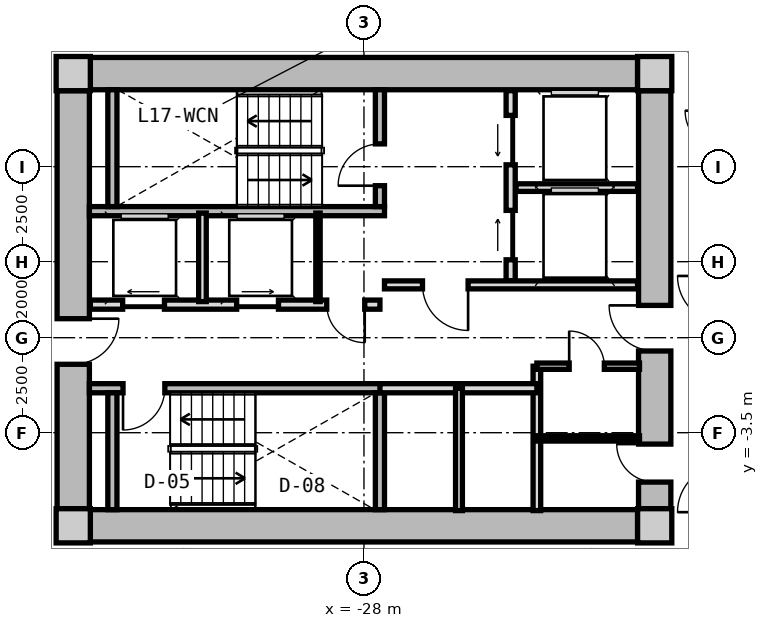
"""IFC4 building model, lengths in metres.
Left out: names, types, materials, properties, quantities, classifications, styles, units other than length and angle.
Written with IfcOpenShell. Run it as: python <this file> out.ifc"""

import sys

from ifc_helpers import new_model, si_unit, direction, frame, frame_2d, origin, origin_2d, place, context, subcontext, project, spatial, rectangle, extrude, source, transform, mapped, element, fill, save


model = new_model("IFC4")
c1 = context("Model", 3, precision=1e-05, world=origin(), true_north=direction((0.0, 1.0)))
c2 = subcontext(c1, "Body", "Model", "MODEL_VIEW")
j1 = project(units=[si_unit("LENGTHUNIT", "METRE"), si_unit("PLANEANGLEUNIT", "RADIAN")], contexts=[c1])
p1 = place(None, origin())
s1 = spatial("IfcSite", under=j1, at=p1, CompositionType="ELEMENT")
p2 = place(p1, origin())
s2 = spatial("IfcBuilding", under=s1, at=p2, CompositionType="ELEMENT")
p3 = place(p2, frame((0.0, 0.0, 58.2)))
s3 = spatial("IfcBuildingStorey", under=s2, at=p3, CompositionType="ELEMENT", Elevation=58.2)
m1 = source(origin(), c2, "Body", "SweptSolid", [
    extrude(rectangle(XDim=0.9, YDim=0.9, at=origin_2d()), origin(), (0.0, 0.0, 1.0), 3.05),
])
for number, where, z_axis, x_axis in (
    (1, (-35.65, -5.95, 0.0), (0.0, 0.0, 1.0), (1.0, 0.0, 0.0)),
    (2, (-20.35, -5.95, 0.0), (0.0, 0.0, 1.0), (1.0, 0.0, 0.0)),
    (3, (-20.35, 5.95, 0.0), (0.0, 0.0, 1.0), (1.0, 0.0, 0.0)),
    (4, (-35.65, 5.95, 0.0), (0.0, 0.0, 1.0), (1.0, 0.0, 0.0)),
):
    element("IfcColumn", number, at=place(p3, frame(where, z_axis=z_axis, x_axis=x_axis)), inside=s3, PredefinedType="COLUMN", context=c2, shape_type="MappedRepresentation", body=[
        mapped(m1, transform((0.0, 0.0, 0.0), x_axis=(1.0, 0.0, 0.0), y_axis=(0.0, 1.0, 0.0), z_axis=(0.0, 0.0, 1.0), scale=1.0)),
    ])
m2 = source(origin(), c2, "Body", "SweptSolid", [
    extrude(rectangle(XDim=14.4, YDim=0.85, at=frame_2d((7.2, 0.0))), origin(), (0.0, 0.0, 1.0), 2.79),
])
for number, where, z_axis, x_axis in (
    (5, (-35.2, 5.95, 0.0), (0.0, 0.0, 1.0), (1.0, 0.0, 0.0)),
    (6, (-20.8, -5.95, 0.0), (0.0, 0.0, 1.0), (-1.0, 0.0, 0.0)),
):
    element("IfcWall", number, at=place(p3, frame(where, z_axis=z_axis, x_axis=x_axis)), inside=s3, PredefinedType="SHEAR", context=c2, shape_type="MappedRepresentation", body=[
        mapped(m2, transform((0.0, 0.0, 0.0), x_axis=(1.0, 0.0, 0.0), y_axis=(0.0, 1.0, 0.0), z_axis=(0.0, 0.0, 1.0), scale=1.0)),
    ])
m3 = source(origin(), c2, "Body", "SweptSolid", [
    extrude(rectangle(XDim=11.0, YDim=0.85, at=frame_2d((5.5, 0.0))), origin(), (0.0, 0.0, 1.0), 2.79),
])
p4 = place(p3, frame((-35.65, -5.5, 0.0), z_axis=(0.0, 0.0, 1.0), x_axis=(0.0, 1.0, 0.0)))
e7 = element("IfcWall", 7, at=p4, inside=s3, PredefinedType="SHEAR", context=c2, shape_type="MappedRepresentation", body=[
    mapped(m3, transform((0.0, 0.0, 0.0), x_axis=(1.0, 0.0, 0.0), y_axis=(0.0, 1.0, 0.0), z_axis=(0.0, 0.0, 1.0), scale=1.0)),
])
p5 = place(p4, frame((3.8, 0.0, 0.0)))
e8 = element("IfcOpeningElement", 8, at=p5, cuts=e7, PredefinedType="OPENING", context=c2, shape_type="SweptSolid", body=[
    extrude(rectangle(XDim=1.2, YDim=2.15, at=frame_2d((0.6, 1.075))), frame((0.0, 0.435, 0.0), z_axis=(0.0, -1.0, 0.0), x_axis=(1.0, 0.0, 0.0)), (0.0, 0.0, 1.0), 0.87),
])
p6 = place(p3, frame((-20.35, 5.5, 0.0), z_axis=(0.0, 0.0, 1.0), x_axis=(0.0, -1.0, 0.0)))
e9 = element("IfcWall", 9, at=p6, inside=s3, PredefinedType="SHEAR", context=c2, shape_type="MappedRepresentation", body=[
    mapped(m3, transform((0.0, 0.0, 0.0), x_axis=(1.0, 0.0, 0.0), y_axis=(0.0, 1.0, 0.0), z_axis=(0.0, 0.0, 1.0), scale=1.0)),
])
p7 = place(p6, frame((5.65, 0.0, 0.0)))
e10 = element("IfcOpeningElement", 10, at=p7, cuts=e9, PredefinedType="OPENING", context=c2, shape_type="SweptSolid", body=[
    extrude(rectangle(XDim=1.2, YDim=2.15, at=frame_2d((0.6, 1.075))), frame((0.0, 0.435, 0.0), z_axis=(0.0, -1.0, 0.0), x_axis=(1.0, 0.0, 0.0)), (0.0, 0.0, 1.0), 0.87),
])
p8 = place(p6, frame((9.3, 0.0, 0.0)))
e11 = element("IfcOpeningElement", 11, at=p8, cuts=e9, PredefinedType="OPENING", context=c2, shape_type="SweptSolid", body=[
    extrude(rectangle(XDim=1.0, YDim=2.1, at=frame_2d((0.5, 1.05))), frame((0.0, 0.435, 0.0), z_axis=(0.0, -1.0, 0.0), x_axis=(1.0, 0.0, 0.0)), (0.0, 0.0, 1.0), 0.87),
])
m4 = source(origin(), c2, "Body", "SweptSolid", [
    extrude(rectangle(XDim=7.765, YDim=0.24, at=frame_2d((3.883, 0.0))), origin(), (0.0, 0.0, 1.0), 2.79),
])
p9 = place(p3, frame((-35.225, 2.33, 0.0), z_axis=(0.0, 0.0, 1.0), x_axis=(1.0, 0.0, 0.0)))
e12 = element("IfcWall", 12, at=p9, inside=s3, PredefinedType="PARTITIONING", context=c2, shape_type="MappedRepresentation", body=[
    mapped(m4, transform((0.0, 0.0, 0.0), x_axis=(1.0, 0.0, 0.0), y_axis=(0.0, 1.0, 0.0), z_axis=(0.0, 0.0, 1.0), scale=1.0)),
])
m5 = source(origin(), c2, "Body", "SweptSolid", [
    extrude(rectangle(XDim=3.075, YDim=0.24, at=frame_2d((1.538, 0.0))), origin(), (0.0, 0.0, 1.0), 2.79),
])
p10 = place(p3, frame((-34.62, 2.45, 0.0), z_axis=(0.0, 0.0, 1.0), x_axis=(0.0, 1.0, 0.0)))
e13 = element("IfcWall", 13, at=p10, inside=s3, PredefinedType="PARTITIONING", context=c2, shape_type="MappedRepresentation", body=[
    mapped(m5, transform((0.0, 0.0, 0.0), x_axis=(1.0, 0.0, 0.0), y_axis=(0.0, 1.0, 0.0), z_axis=(0.0, 0.0, 1.0), scale=1.0)),
])
p11 = place(p3, frame((-27.58, 2.45, 0.0), z_axis=(0.0, 0.0, 1.0), x_axis=(0.0, 1.0, 0.0)))
e14 = element("IfcWall", 14, at=p11, inside=s3, PredefinedType="PARTITIONING", context=c2, shape_type="MappedRepresentation", body=[
    mapped(m5, transform((0.0, 0.0, 0.0), x_axis=(1.0, 0.0, 0.0), y_axis=(0.0, 1.0, 0.0), z_axis=(0.0, 0.0, 1.0), scale=1.0)),
])
p12 = place(p11, frame((0.55, 0.0, 0.0)))
e15 = element("IfcOpeningElement", 15, at=p12, cuts=e14, PredefinedType="OPENING", context=c2, shape_type="SweptSolid", body=[
    extrude(rectangle(XDim=1.1, YDim=2.15, at=frame_2d((0.55, 1.075))), frame((0.0, 0.13, 0.0), z_axis=(0.0, -1.0, 0.0), x_axis=(1.0, 0.0, 0.0)), (0.0, 0.0, 1.0), 0.26),
])
p13 = place(p3, frame((-35.225, -2.33, 0.0), z_axis=(0.0, 0.0, 1.0), x_axis=(1.0, 0.0, 0.0)))
e16 = element("IfcWall", 16, at=p13, inside=s3, PredefinedType="PARTITIONING", context=c2, shape_type="MappedRepresentation", body=[
    mapped(m4, transform((0.0, 0.0, 0.0), x_axis=(1.0, 0.0, 0.0), y_axis=(0.0, 1.0, 0.0), z_axis=(0.0, 0.0, 1.0), scale=1.0)),
])
p14 = place(p13, frame((0.885, 0.0, 0.0)))
e17 = element("IfcOpeningElement", 17, at=p14, cuts=e16, PredefinedType="OPENING", context=c2, shape_type="SweptSolid", body=[
    extrude(rectangle(XDim=1.1, YDim=2.15, at=frame_2d((0.55, 1.075))), frame((0.0, 0.13, 0.0), z_axis=(0.0, -1.0, 0.0), x_axis=(1.0, 0.0, 0.0)), (0.0, 0.0, 1.0), 0.26),
])
for number, where, z_axis, x_axis in (
    (18, (-34.62, -5.525, 0.0), (0.0, 0.0, 1.0), (0.0, 1.0, 0.0)),
    (19, (-27.58, -5.525, 0.0), (0.0, 0.0, 1.0), (0.0, 1.0, 0.0)),
):
    element("IfcWall", number, at=place(p3, frame(where, z_axis=z_axis, x_axis=x_axis)), inside=s3, PredefinedType="PARTITIONING", context=c2, shape_type="MappedRepresentation", body=[
        mapped(m5, transform((0.0, 0.0, 0.0), x_axis=(1.0, 0.0, 0.0), y_axis=(0.0, 1.0, 0.0), z_axis=(0.0, 0.0, 1.0), scale=1.0)),
    ])
m6 = source(origin(), c2, "Body", "SweptSolid", [
    extrude(rectangle(XDim=5.0, YDim=0.24, at=frame_2d((2.5, 0.0))), origin(), (0.0, 0.0, 1.0), 2.775),
])
p15 = place(p3, frame((-24.14, 0.5, 0.0), z_axis=(0.0, 0.0, 1.0), x_axis=(0.0, 1.0, 0.0)))
e20 = element("IfcWall", 20, at=p15, inside=s3, PredefinedType="PARTITIONING", context=c2, shape_type="MappedRepresentation", body=[
    mapped(m6, transform((0.0, 0.0, 0.0), x_axis=(1.0, 0.0, 0.0), y_axis=(0.0, 1.0, 0.0), z_axis=(0.0, 0.0, 1.0), scale=1.0)),
])
p16 = place(p15, frame((3.05, 0.0, 0.0)))
e21 = element("IfcOpeningElement", 21, at=p16, cuts=e20, PredefinedType="OPENING", context=c2, shape_type="SweptSolid", body=[
    extrude(rectangle(XDim=1.3, YDim=2.2, at=frame_2d((0.65, 1.1))), frame((0.0, 0.13, 0.0), z_axis=(0.0, -1.0, 0.0), x_axis=(1.0, 0.0, 0.0)), (0.0, 0.0, 1.0), 0.26),
])
p17 = place(p15, frame((0.55, 0.0, 0.0)))
e22 = element("IfcOpeningElement", 22, at=p17, cuts=e20, PredefinedType="OPENING", context=c2, shape_type="SweptSolid", body=[
    extrude(rectangle(XDim=1.3, YDim=2.2, at=frame_2d((0.65, 1.1))), frame((0.0, 0.13, 0.0), z_axis=(0.0, -1.0, 0.0), x_axis=(1.0, 0.0, 0.0)), (0.0, 0.0, 1.0), 0.26),
])
m7 = source(origin(), c2, "Body", "SweptSolid", [
    extrude(rectangle(XDim=3.2, YDim=0.2, at=frame_2d((1.6, 0.0))), origin(), (0.0, 0.0, 1.0), 2.775),
])
p18 = place(p3, frame((-24.0, 2.95, 0.0), z_axis=(0.0, 0.0, 1.0), x_axis=(1.0, 0.0, 0.0)))
e23 = element("IfcWall", 23, at=p18, inside=s3, PredefinedType="PARTITIONING", context=c2, shape_type="MappedRepresentation", body=[
    mapped(m7, transform((0.0, 0.0, 0.0), x_axis=(1.0, 0.0, 0.0), y_axis=(0.0, 1.0, 0.0), z_axis=(0.0, 0.0, 1.0), scale=1.0)),
])
m8 = source(origin(), c2, "Body", "SweptSolid", [
    extrude(rectangle(XDim=6.66, YDim=0.21, at=frame_2d((3.33, 0.0))), origin(), (0.0, 0.0, 1.0), 2.775),
])
p19 = place(p3, frame((-27.46, 0.39, 0.0), z_axis=(0.0, 0.0, 1.0), x_axis=(1.0, 0.0, 0.0)))
e24 = element("IfcWall", 24, at=p19, inside=s3, PredefinedType="PARTITIONING", context=c2, shape_type="MappedRepresentation", body=[
    mapped(m8, transform((0.0, 0.0, 0.0), x_axis=(1.0, 0.0, 0.0), y_axis=(0.0, 1.0, 0.0), z_axis=(0.0, 0.0, 1.0), scale=1.0)),
])
p20 = place(p19, frame((1.0, 0.0, 0.0)))
e25 = element("IfcOpeningElement", 25, at=p20, cuts=e24, PredefinedType="OPENING", context=c2, shape_type="SweptSolid", body=[
    extrude(rectangle(XDim=1.2, YDim=2.15, at=frame_2d((0.6, 1.075))), frame((0.0, 0.115, 0.0), z_axis=(0.0, -1.0, 0.0), x_axis=(1.0, 0.0, 0.0)), (0.0, 0.0, 1.0), 0.23),
])
m9 = source(origin(), c2, "Body", "SweptSolid", [
    extrude(rectangle(XDim=7.62, YDim=0.24, at=frame_2d((3.81, 0.0))), origin(), (0.0, 0.0, 1.0), 2.775),
])
p21 = place(p3, frame((-35.2, -0.13, 0.0), z_axis=(0.0, 0.0, 1.0), x_axis=(1.0, 0.0, 0.0)))
e26 = element("IfcWall", 26, at=p21, inside=s3, PredefinedType="PARTITIONING", context=c2, shape_type="MappedRepresentation", body=[
    mapped(m9, transform((0.0, 0.0, 0.0), x_axis=(1.0, 0.0, 0.0), y_axis=(0.0, 1.0, 0.0), z_axis=(0.0, 0.0, 1.0), scale=1.0)),
])
p22 = place(p21, frame((6.22, 0.0, 0.0)))
e27 = element("IfcOpeningElement", 27, at=p22, cuts=e26, PredefinedType="OPENING", context=c2, shape_type="SweptSolid", body=[
    extrude(rectangle(XDim=1.0, YDim=2.1, at=frame_2d((0.5, 1.05))), frame((0.0, 0.13, 0.0), z_axis=(0.0, -1.0, 0.0), x_axis=(1.0, 0.0, 0.0)), (0.0, 0.0, 1.0), 0.26),
])
p23 = place(p21, frame((0.85, 0.0, 0.0)))
e28 = element("IfcOpeningElement", 28, at=p23, cuts=e26, PredefinedType="OPENING", context=c2, shape_type="SweptSolid", body=[
    extrude(rectangle(XDim=1.1, YDim=2.2, at=frame_2d((0.55, 1.1))), frame((0.0, 0.13, 0.0), z_axis=(0.0, -1.0, 0.0), x_axis=(1.0, 0.0, 0.0)), (0.0, 0.0, 1.0), 0.26),
])
p24 = place(p21, frame((3.85, 0.0, 0.0)))
e29 = element("IfcOpeningElement", 29, at=p24, cuts=e26, PredefinedType="OPENING", context=c2, shape_type="SweptSolid", body=[
    extrude(rectangle(XDim=1.1, YDim=2.2, at=frame_2d((0.55, 1.1))), frame((0.0, 0.13, 0.0), z_axis=(0.0, -1.0, 0.0), x_axis=(1.0, 0.0, 0.0)), (0.0, 0.0, 1.0), 0.26),
])
m10 = source(origin(), c2, "Body", "SweptSolid", [
    extrude(rectangle(XDim=2.33, YDim=0.115, at=frame_2d((1.165, 0.0))), origin(), (0.0, 0.0, 1.0), 2.775),
])
p25 = place(p3, frame((-29.21, -0.05, 0.0), z_axis=(0.0, 0.0, 1.0), x_axis=(0.0, 1.0, 0.0)))
e30 = element("IfcWall", 30, at=p25, inside=s3, PredefinedType="PARTITIONING", context=c2, shape_type="MappedRepresentation", body=[
    mapped(m10, transform((0.0, 0.0, 0.0), x_axis=(1.0, 0.0, 0.0), y_axis=(0.0, 1.0, 0.0), z_axis=(0.0, 0.0, 1.0), scale=1.0)),
])
m11 = source(origin(), c2, "Body", "SweptSolid", [
    extrude(rectangle(XDim=2.33, YDim=0.2, at=frame_2d((1.165, 0.0))), origin(), (0.0, 0.0, 1.0), 2.775),
])
p26 = place(p3, frame((-32.25, -0.05, 0.0), z_axis=(0.0, 0.0, 1.0), x_axis=(0.0, 1.0, 0.0)))
e31 = element("IfcWall", 31, at=p26, inside=s3, PredefinedType="PARTITIONING", context=c2, shape_type="MappedRepresentation", body=[
    mapped(m11, transform((0.0, 0.0, 0.0), x_axis=(1.0, 0.0, 0.0), y_axis=(0.0, 1.0, 0.0), z_axis=(0.0, 0.0, 1.0), scale=1.0)),
])
m12 = source(origin(), c2, "Body", "SweptSolid", [
    extrude(rectangle(XDim=3.8, YDim=0.2, at=frame_2d((1.9, 0.0))), origin(), (0.0, 0.0, 1.0), 2.775),
])
p27 = place(p3, frame((-23.45, -5.55, 0.0), z_axis=(0.0, 0.0, 1.0), x_axis=(0.0, 1.0, 0.0)))
e32 = element("IfcWall", 32, at=p27, inside=s3, PredefinedType="PARTITIONING", context=c2, shape_type="MappedRepresentation", body=[
    mapped(m12, transform((0.0, 0.0, 0.0), x_axis=(1.0, 0.0, 0.0), y_axis=(0.0, 1.0, 0.0), z_axis=(0.0, 0.0, 1.0), scale=1.0)),
])
m13 = source(origin(), c2, "Body", "SweptSolid", [
    extrude(rectangle(XDim=4.13, YDim=0.24, at=frame_2d((2.065, 0.0))), origin(), (0.0, 0.0, 1.0), 2.775),
])
p28 = place(p3, frame((-27.58, -2.33, 0.0), z_axis=(0.0, 0.0, 1.0), x_axis=(1.0, 0.0, 0.0)))
e33 = element("IfcWall", 33, at=p28, inside=s3, PredefinedType="PARTITIONING", context=c2, shape_type="MappedRepresentation", body=[
    mapped(m13, transform((0.0, 0.0, 0.0), x_axis=(1.0, 0.0, 0.0), y_axis=(0.0, 1.0, 0.0), z_axis=(0.0, 0.0, 1.0), scale=1.0)),
])
m14 = source(origin(), c2, "Body", "SweptSolid", [
    extrude(rectangle(XDim=3.22, YDim=0.18, at=frame_2d((1.61, 0.0))), origin(), (0.0, 0.0, 1.0), 2.775),
])
p29 = place(p3, frame((-25.5, -5.55, 0.0), z_axis=(0.0, 0.0, 1.0), x_axis=(0.0, 1.0, 0.0)))
e34 = element("IfcWall", 34, at=p29, inside=s3, PredefinedType="PARTITIONING", context=c2, shape_type="MappedRepresentation", body=[
    mapped(m14, transform((0.0, 0.0, 0.0), x_axis=(1.0, 0.0, 0.0), y_axis=(0.0, 1.0, 0.0), z_axis=(0.0, 0.0, 1.0), scale=1.0)),
])
m15 = source(origin(), c2, "Body", "SweptSolid", [
    extrude(rectangle(XDim=2.7, YDim=0.165, at=frame_2d((1.35, 0.0))), origin(), (0.0, 0.0, 1.0), 2.775),
])
p30 = place(p3, frame((-23.45, -1.75, 0.0), z_axis=(0.0, 0.0, 1.0), x_axis=(1.0, 0.0, 0.0)))
e35 = element("IfcWall", 35, at=p30, inside=s3, PredefinedType="PARTITIONING", context=c2, shape_type="MappedRepresentation", body=[
    mapped(m15, transform((0.0, 0.0, 0.0), x_axis=(1.0, 0.0, 0.0), y_axis=(0.0, 1.0, 0.0), z_axis=(0.0, 0.0, 1.0), scale=1.0)),
])
p31 = place(p30, frame((0.85, 0.0, 0.0)))
e36 = element("IfcOpeningElement", 36, at=p31, cuts=e35, PredefinedType="OPENING", context=c2, shape_type="SweptSolid", body=[
    extrude(rectangle(XDim=0.925, YDim=2.1, at=frame_2d((0.462, 1.05))), frame((0.0, 0.093, 0.0), z_axis=(0.0, -1.0, 0.0), x_axis=(1.0, 0.0, 0.0)), (0.0, 0.0, 1.0), 0.185),
])
m16 = source(origin(), c2, "Body", "SweptSolid", [
    extrude(rectangle(XDim=2.7, YDim=0.14, at=frame_2d((1.35, 0.0))), origin(), (0.0, 0.0, 1.0), 2.775),
])
p32 = place(p3, frame((-23.45, -3.65, 0.0), z_axis=(0.0, 0.0, 1.0), x_axis=(1.0, 0.0, 0.0)))
e37 = element("IfcWall", 37, at=p32, inside=s3, PredefinedType="PARTITIONING", context=c2, shape_type="MappedRepresentation", body=[
    mapped(m16, transform((0.0, 0.0, 0.0), x_axis=(1.0, 0.0, 0.0), y_axis=(0.0, 1.0, 0.0), z_axis=(0.0, 0.0, 1.0), scale=1.0)),
])
m17 = source(origin(), c2, "Body", "SweptSolid", [
    extrude(rectangle(XDim=1.1, YDim=2.15, at=frame_2d((0.55, 1.075))), frame((0.0, 0.025, 0.0), z_axis=(0.0, -1.0, 0.0), x_axis=(1.0, 0.0, 0.0)), (0.0, 0.0, 1.0), 0.05),
])
p33 = place(p12, origin())
e38 = element("IfcDoor", 38, at=p33, inside=s3, OperationType="SINGLE_SWING_LEFT", PredefinedType="DOOR", context=c2, shape_type="MappedRepresentation", body=[
    mapped(m17, transform((0.0, 0.0, 0.0), x_axis=(1.0, 0.0, 0.0), y_axis=(0.0, 1.0, 0.0), z_axis=(0.0, 0.0, 1.0), scale=1.0)),
])
fill(e15, e38)
p34 = place(p14, frame((1.1, 0.0, 0.0), z_axis=(0.0, 0.0, 1.0), x_axis=(-1.0, 0.0, 0.0)))
e39 = element("IfcDoor", 39, at=p34, inside=s3, OperationType="SINGLE_SWING_RIGHT", PredefinedType="DOOR", context=c2, shape_type="MappedRepresentation", body=[
    mapped(m17, transform((0.0, 0.0, 0.0), x_axis=(1.0, 0.0, 0.0), y_axis=(0.0, 1.0, 0.0), z_axis=(0.0, 0.0, 1.0), scale=1.0)),
])
fill(e17, e39)
m18 = source(origin(), c2, "Body", "SweptSolid", [
    extrude(rectangle(XDim=1.3, YDim=2.2, at=frame_2d((0.65, 1.1))), frame((0.0, 0.025, 0.0), z_axis=(0.0, -1.0, 0.0), x_axis=(1.0, 0.0, 0.0)), (0.0, 0.0, 1.0), 0.05),
])
p35 = place(p16, origin())
e40 = element("IfcDoor", 40, at=p35, inside=s3, OperationType="SLIDING_TO_LEFT", PredefinedType="DOOR", context=c2, shape_type="MappedRepresentation", body=[
    mapped(m18, transform((0.0, 0.0, 0.0), x_axis=(1.0, 0.0, 0.0), y_axis=(0.0, 1.0, 0.0), z_axis=(0.0, 0.0, 1.0), scale=1.0)),
])
fill(e21, e40)
p36 = place(p17, origin())
e41 = element("IfcDoor", 41, at=p36, inside=s3, OperationType="SLIDING_TO_RIGHT", PredefinedType="DOOR", context=c2, shape_type="MappedRepresentation", body=[
    mapped(m18, transform((0.0, 0.0, 0.0), x_axis=(1.0, 0.0, 0.0), y_axis=(0.0, 1.0, 0.0), z_axis=(0.0, 0.0, 1.0), scale=1.0)),
])
fill(e22, e41)
m19 = source(origin(), c2, "Body", "SweptSolid", [
    extrude(rectangle(XDim=1.2, YDim=2.15, at=frame_2d((0.6, 1.075))), frame((0.0, 0.025, 0.0), z_axis=(0.0, -1.0, 0.0), x_axis=(1.0, 0.0, 0.0)), (0.0, 0.0, 1.0), 0.05),
])
p37 = place(p20, frame((1.2, 0.0, 0.0), z_axis=(0.0, 0.0, 1.0), x_axis=(-1.0, 0.0, 0.0)))
e42 = element("IfcDoor", 42, at=p37, inside=s3, OperationType="SINGLE_SWING_LEFT", PredefinedType="DOOR", context=c2, shape_type="MappedRepresentation", body=[
    mapped(m19, transform((0.0, 0.0, 0.0), x_axis=(1.0, 0.0, 0.0), y_axis=(0.0, 1.0, 0.0), z_axis=(0.0, 0.0, 1.0), scale=1.0)),
])
fill(e25, e42)
p38 = place(p5, frame((1.2, 0.0, 0.0), z_axis=(0.0, 0.0, 1.0), x_axis=(-1.0, 0.0, 0.0)))
e43 = element("IfcDoor", 43, at=p38, inside=s3, OperationType="SINGLE_SWING_LEFT", PredefinedType="DOOR", context=c2, shape_type="MappedRepresentation", body=[
    mapped(m19, transform((0.0, 0.0, 0.0), x_axis=(1.0, 0.0, 0.0), y_axis=(0.0, 1.0, 0.0), z_axis=(0.0, 0.0, 1.0), scale=1.0)),
])
fill(e8, e43)
p39 = place(p7, frame((1.2, 0.0, 0.0), z_axis=(0.0, 0.0, 1.0), x_axis=(-1.0, 0.0, 0.0)))
e44 = element("IfcDoor", 44, at=p39, inside=s3, OperationType="SINGLE_SWING_RIGHT", PredefinedType="DOOR", context=c2, shape_type="MappedRepresentation", body=[
    mapped(m19, transform((0.0, 0.0, 0.0), x_axis=(1.0, 0.0, 0.0), y_axis=(0.0, 1.0, 0.0), z_axis=(0.0, 0.0, 1.0), scale=1.0)),
])
fill(e10, e44)
m20 = source(origin(), c2, "Body", "SweptSolid", [
    extrude(rectangle(XDim=1.0, YDim=2.1, at=frame_2d((0.5, 1.05))), frame((0.0, 0.025, 0.0), z_axis=(0.0, -1.0, 0.0), x_axis=(1.0, 0.0, 0.0)), (0.0, 0.0, 1.0), 0.05),
])
p40 = place(p22, frame((1.0, 0.0, 0.0), z_axis=(0.0, 0.0, 1.0), x_axis=(-1.0, 0.0, 0.0)))
e45 = element("IfcDoor", 45, at=p40, inside=s3, OperationType="SINGLE_SWING_LEFT", PredefinedType="DOOR", context=c2, shape_type="MappedRepresentation", body=[
    mapped(m20, transform((0.0, 0.0, 0.0), x_axis=(1.0, 0.0, 0.0), y_axis=(0.0, 1.0, 0.0), z_axis=(0.0, 0.0, 1.0), scale=1.0)),
])
fill(e27, e45)
m21 = source(origin(), c2, "Body", "SweptSolid", [
    extrude(rectangle(XDim=1.1, YDim=2.2, at=frame_2d((0.55, 1.1))), frame((0.0, 0.025, 0.0), z_axis=(0.0, -1.0, 0.0), x_axis=(1.0, 0.0, 0.0)), (0.0, 0.0, 1.0), 0.05),
])
p41 = place(p23, origin())
e46 = element("IfcDoor", 46, at=p41, inside=s3, OperationType="SLIDING_TO_LEFT", PredefinedType="DOOR", context=c2, shape_type="MappedRepresentation", body=[
    mapped(m21, transform((0.0, 0.0, 0.0), x_axis=(1.0, 0.0, 0.0), y_axis=(0.0, 1.0, 0.0), z_axis=(0.0, 0.0, 1.0), scale=1.0)),
])
fill(e28, e46)
p42 = place(p24, origin())
e47 = element("IfcDoor", 47, at=p42, inside=s3, OperationType="SLIDING_TO_RIGHT", PredefinedType="DOOR", context=c2, shape_type="MappedRepresentation", body=[
    mapped(m21, transform((0.0, 0.0, 0.0), x_axis=(1.0, 0.0, 0.0), y_axis=(0.0, 1.0, 0.0), z_axis=(0.0, 0.0, 1.0), scale=1.0)),
])
fill(e29, e47)
m22 = source(origin(), c2, "Body", "SweptSolid", [
    extrude(rectangle(XDim=0.925, YDim=2.1, at=frame_2d((0.462, 1.05))), frame((0.0, 0.025, 0.0), z_axis=(0.0, -1.0, 0.0), x_axis=(1.0, 0.0, 0.0)), (0.0, 0.0, 1.0), 0.05),
])
p43 = place(p31, origin())
e48 = element("IfcDoor", 48, at=p43, inside=s3, OperationType="SINGLE_SWING_LEFT", PredefinedType="DOOR", context=c2, shape_type="MappedRepresentation", body=[
    mapped(m22, transform((0.0, 0.0, 0.0), x_axis=(1.0, 0.0, 0.0), y_axis=(0.0, 1.0, 0.0), z_axis=(0.0, 0.0, 1.0), scale=1.0)),
])
fill(e36, e48)
p44 = place(p8, frame((1.0, 0.0, 0.0), z_axis=(0.0, 0.0, 1.0), x_axis=(-1.0, 0.0, 0.0)))
e49 = element("IfcDoor", 49, at=p44, inside=s3, OperationType="SINGLE_SWING_RIGHT", PredefinedType="DOOR", context=c2, shape_type="MappedRepresentation", body=[
    mapped(m20, transform((0.0, 0.0, 0.0), x_axis=(1.0, 0.0, 0.0), y_axis=(0.0, 1.0, 0.0), z_axis=(0.0, 0.0, 1.0), scale=1.0)),
])
fill(e11, e49)
save(model, sys.argv[1])
